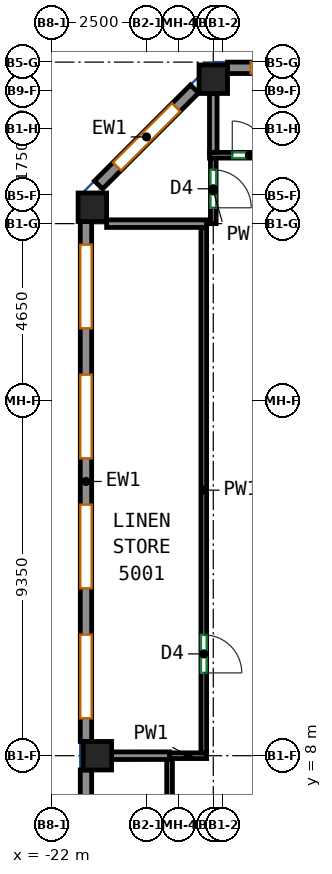
"""IFC4 building model, lengths in metres.
Left out: names, types, materials, properties, quantities, classifications, styles, units other than length and angle.
Written with IfcOpenShell. Run it as: python <this file> out.ifc"""

import sys

from ifc_helpers import new_model, si_unit, direction, frame, frame_2d, origin, origin_2d, place, context, subcontext, project, spatial, rectangle, extrude, source, transform, mapped, element, fill, save


model = new_model("IFC4")
c1 = context("Model", 3, precision=1e-05, world=origin(), true_north=direction((0.0, 1.0)))
c2 = subcontext(c1, "Body", "Model", "MODEL_VIEW")
j1 = project(units=[si_unit("LENGTHUNIT", "METRE"), si_unit("PLANEANGLEUNIT", "RADIAN")], contexts=[c1])
p1 = place(None, origin())
s1 = spatial("IfcSite", under=j1, at=p1, CompositionType="ELEMENT")
p2 = place(p1, origin())
s2 = spatial("IfcBuilding", under=s1, at=p2, CompositionType="ELEMENT")
p3 = place(p2, frame((0.0, 0.0, 206.7)))
s3 = spatial("IfcBuildingStorey", under=s2, at=p3, CompositionType="ELEMENT", Elevation=206.7)
m1 = source(origin(), c2, "Body", "SweptSolid", [
    extrude(rectangle(XDim=0.75, YDim=0.75, at=origin_2d()), origin(), (0.0, 0.0, 1.0), 3.12),
])
for number, where, z_axis, x_axis in (
    (1, (-20.932, 22.432, 0.0), (0.0, 0.0, 1.0), (1.0, 0.0, 0.0)),
    (2, (-20.8, 8.0, 0.0), (0.0, 0.0, 1.0), (1.0, 0.0, 0.0)),
    (3, (-17.75, 25.8, 0.0), (0.0, 0.0, 1.0), (1.0, 0.0, 0.0)),
):
    element("IfcColumn", number, at=place(p3, frame(where, z_axis=z_axis, x_axis=x_axis)), inside=s3, PredefinedType="COLUMN", context=c2, shape_type="MappedRepresentation", body=[
        mapped(m1, transform((0.0, 0.0, 0.0))),
    ])
m2 = source(origin(), c2, "Body", "SweptSolid", [
    extrude(rectangle(XDim=6.833, YDim=0.3, at=frame_2d((3.417, 0.0))), origin(), (0.0, 0.0, 1.0), 3.12),
])
p4 = place(p3, frame((-10.542, 26.1, 0.0), z_axis=(0.0, 0.0, 1.0), x_axis=(-1.0, 0.0, 0.0)))
e4 = element("IfcWall", 4, at=p4, inside=s3, PredefinedType="SOLIDWALL", context=c2, shape_type="MappedRepresentation", body=[
    mapped(m2, transform((0.0, 0.0, 0.0))),
])
p5 = place(p4, frame((0.608, 0.0, 0.85)))
e5 = element("IfcOpeningElement", 5, at=p5, cuts=e4, PredefinedType="OPENING", context=c2, shape_type="SweptSolid", body=[
    extrude(rectangle(XDim=2.2, YDim=1.95, at=frame_2d((1.1, 0.975))), frame((0.0, 0.16, 0.0), z_axis=(0.0, -1.0, 0.0), x_axis=(1.0, 0.0, 0.0)), (0.0, 0.0, 1.0), 0.32),
])
p6 = place(p4, frame((4.025, 0.0, 0.85)))
e6 = element("IfcOpeningElement", 6, at=p6, cuts=e4, PredefinedType="OPENING", context=c2, shape_type="SweptSolid", body=[
    extrude(rectangle(XDim=2.2, YDim=1.95, at=frame_2d((1.1, 0.975))), frame((0.0, 0.16, 0.0), z_axis=(0.0, -1.0, 0.0), x_axis=(1.0, 0.0, 0.0)), (0.0, 0.0, 1.0), 0.32),
])
m3 = source(origin(), c2, "Body", "SweptSolid", [
    extrude(rectangle(XDim=3.571, YDim=0.3, at=frame_2d((1.786, 0.0))), origin(), (0.0, 0.0, 1.0), 3.12),
])
p7 = place(p3, frame((-18.244, 25.544, 0.0), z_axis=(0.0, 0.0, 1.0), x_axis=(-0.707072595841, -0.707140964879, 0.0)))
e7 = element("IfcWall", 7, at=p7, inside=s3, PredefinedType="SOLIDWALL", context=c2, shape_type="MappedRepresentation", body=[
    mapped(m3, transform((0.0, 0.0, 0.0))),
])
p8 = place(p7, frame((0.686, 0.0, 0.85)))
e8 = element("IfcOpeningElement", 8, at=p8, cuts=e7, PredefinedType="OPENING", context=c2, shape_type="SweptSolid", body=[
    extrude(rectangle(XDim=2.2, YDim=1.95, at=frame_2d((1.1, 0.975))), frame((0.0, 0.16, 0.0), z_axis=(0.0, -1.0, 0.0), x_axis=(1.0, 0.0, 0.0)), (0.0, 0.0, 1.0), 0.32),
])
m4 = source(origin(), c2, "Body", "SweptSolid", [
    extrude(rectangle(XDim=13.682, YDim=0.3, at=frame_2d((6.841, 0.0))), origin(), (0.0, 0.0, 1.0), 3.12),
])
p9 = place(p3, frame((-21.1, 22.057, 0.0), z_axis=(0.0, 0.0, 1.0), x_axis=(0.0, -1.0, 0.0)))
e9 = element("IfcWall", 9, at=p9, inside=s3, PredefinedType="SOLIDWALL", context=c2, shape_type="MappedRepresentation", body=[
    mapped(m4, transform((0.0, 0.0, 0.0))),
])
p10 = place(p9, frame((0.61, 0.0, 0.85)))
e10 = element("IfcOpeningElement", 10, at=p10, cuts=e9, PredefinedType="OPENING", context=c2, shape_type="SweptSolid", body=[
    extrude(rectangle(XDim=2.2, YDim=1.95, at=frame_2d((1.1, 0.975))), frame((0.0, 0.16, 0.0), z_axis=(0.0, -1.0, 0.0), x_axis=(1.0, 0.0, 0.0)), (0.0, 0.0, 1.0), 0.32),
])
p11 = place(p9, frame((4.031, 0.0, 0.85)))
e11 = element("IfcOpeningElement", 11, at=p11, cuts=e9, PredefinedType="OPENING", context=c2, shape_type="SweptSolid", body=[
    extrude(rectangle(XDim=2.2, YDim=1.95, at=frame_2d((1.1, 0.975))), frame((0.0, 0.16, 0.0), z_axis=(0.0, -1.0, 0.0), x_axis=(1.0, 0.0, 0.0)), (0.0, 0.0, 1.0), 0.32),
])
p12 = place(p9, frame((7.451, 0.0, 0.85)))
e12 = element("IfcOpeningElement", 12, at=p12, cuts=e9, PredefinedType="OPENING", context=c2, shape_type="SweptSolid", body=[
    extrude(rectangle(XDim=2.2, YDim=1.95, at=frame_2d((1.1, 0.975))), frame((0.0, 0.16, 0.0), z_axis=(0.0, -1.0, 0.0), x_axis=(1.0, 0.0, 0.0)), (0.0, 0.0, 1.0), 0.32),
])
p13 = place(p9, frame((10.872, 0.0, 0.85)))
e13 = element("IfcOpeningElement", 13, at=p13, cuts=e9, PredefinedType="OPENING", context=c2, shape_type="SweptSolid", body=[
    extrude(rectangle(XDim=2.2, YDim=1.95, at=frame_2d((1.1, 0.975))), frame((0.0, 0.16, 0.0), z_axis=(0.0, -1.0, 0.0), x_axis=(1.0, 0.0, 0.0)), (0.0, 0.0, 1.0), 0.32),
])
m5 = source(origin(), c2, "Body", "SweptSolid", [
    extrude(rectangle(XDim=7.812, YDim=0.3, at=frame_2d((3.906, 0.0))), origin(), (0.0, 0.0, 1.0), 3.12),
])
p14 = place(p3, frame((-21.1, 7.625, 0.0), z_axis=(0.0, 0.0, 1.0), x_axis=(0.0, -1.0, 0.0)))
e14 = element("IfcWall", 14, at=p14, inside=s3, PredefinedType="SOLIDWALL", context=c2, shape_type="MappedRepresentation", body=[
    mapped(m5, transform((0.0, 0.0, 0.0))),
])
p15 = place(p14, frame((0.853, 0.0, 0.85)))
e15 = element("IfcOpeningElement", 15, at=p15, cuts=e14, PredefinedType="OPENING", context=c2, shape_type="SweptSolid", body=[
    extrude(rectangle(XDim=2.2, YDim=1.95, at=frame_2d((1.1, 0.975))), frame((0.0, 0.16, 0.0), z_axis=(0.0, -1.0, 0.0), x_axis=(1.0, 0.0, 0.0)), (0.0, 0.0, 1.0), 0.32),
])
p16 = place(p14, frame((4.759, 0.0, 0.85)))
e16 = element("IfcOpeningElement", 16, at=p16, cuts=e14, PredefinedType="OPENING", context=c2, shape_type="SweptSolid", body=[
    extrude(rectangle(XDim=2.2, YDim=1.95, at=frame_2d((1.1, 0.975))), frame((0.0, 0.16, 0.0), z_axis=(0.0, -1.0, 0.0), x_axis=(1.0, 0.0, 0.0)), (0.0, 0.0, 1.0), 0.32),
])
p17 = place(p3, frame((-17.925, 8.0, 0.0), z_axis=(0.0, 0.0, 1.0), x_axis=(-1.0, 0.0, 0.0)))
e17 = element("IfcWall", 17, at=p17, inside=s3, PredefinedType="PARTITIONING", context=c2, shape_type="SweptSolid", body=[
    extrude(rectangle(XDim=0.976, YDim=0.15, at=frame_2d((0.488, 0.0))), origin(), (0.0, 0.0, 1.0), 3.12),
])
p18 = place(p3, frame((-18.0, 21.9, 0.0), z_axis=(0.0, 0.0, 1.0), x_axis=(0.0, -1.0, 0.0)))
e18 = element("IfcWall", 18, at=p18, inside=s3, PredefinedType="PARTITIONING", context=c2, shape_type="SweptSolid", body=[
    extrude(rectangle(XDim=13.825, YDim=0.15, at=frame_2d((6.913, 0.0))), origin(), (0.0, 0.0, 1.0), 3.12),
])
p19 = place(p18, frame((10.721, 0.0, 0.0)))
e19 = element("IfcOpeningElement", 19, at=p19, cuts=e18, PredefinedType="OPENING", context=c2, shape_type="SweptSolid", body=[
    extrude(rectangle(XDim=1.0, YDim=2.1, at=frame_2d((0.5, 1.05))), frame((0.0, 0.085, 0.0), z_axis=(0.0, -1.0, 0.0), x_axis=(1.0, 0.0, 0.0)), (0.0, 0.0, 1.0), 0.17),
])
p20 = place(p3, frame((-18.9, 3.809, 0.0), z_axis=(0.0, 0.0, 1.0), x_axis=(0.0, 1.0, 0.0)))
e20 = element("IfcWall", 20, at=p20, inside=s3, PredefinedType="PARTITIONING", context=c2, shape_type="SweptSolid", body=[
    extrude(rectangle(XDim=4.092, YDim=0.15, at=frame_2d((2.046, 0.0))), origin(), (0.0, 0.0, 1.0), 3.12),
])
p21 = place(p20, frame((2.111, 0.0, 0.0)))
e21 = element("IfcOpeningElement", 21, at=p21, cuts=e20, PredefinedType="OPENING", context=c2, shape_type="SweptSolid", body=[
    extrude(rectangle(XDim=1.0, YDim=2.1, at=frame_2d((0.5, 1.05))), frame((0.0, 0.085, 0.0), z_axis=(0.0, -1.0, 0.0), x_axis=(1.0, 0.0, 0.0)), (0.0, 0.0, 1.0), 0.17),
])
p22 = place(p3, frame((-17.75, 23.725, 0.0), z_axis=(0.0, 0.0, 1.0), x_axis=(0.0, -1.0, 0.0)))
e22 = element("IfcWall", 22, at=p22, inside=s3, PredefinedType="PARTITIONING", context=c2, shape_type="SweptSolid", body=[
    extrude(rectangle(XDim=1.725, YDim=0.15, at=frame_2d((0.863, 0.0))), origin(), (0.0, 0.0, 1.0), 3.12),
])
p23 = place(p22, frame((0.308, 0.0, 0.0)))
e23 = element("IfcOpeningElement", 23, at=p23, cuts=e22, PredefinedType="OPENING", context=c2, shape_type="SweptSolid", body=[
    extrude(rectangle(XDim=1.0, YDim=2.1, at=frame_2d((0.5, 1.05))), frame((0.0, 0.085, 0.0), z_axis=(0.0, -1.0, 0.0), x_axis=(1.0, 0.0, 0.0)), (0.0, 0.0, 1.0), 0.17),
])
p24 = place(p3, frame((-17.85, 23.8, 0.0), z_axis=(0.0, 0.0, 1.0), x_axis=(1.0, 0.0, 0.0)))
e24 = element("IfcWall", 24, at=p24, inside=s3, PredefinedType="PARTITIONING", context=c2, shape_type="SweptSolid", body=[
    extrude(rectangle(XDim=45.7, YDim=0.15, at=frame_2d((22.85, 0.0))), origin(), (0.0, 0.0, 1.0), 3.12),
])
p25 = place(p24, frame((0.6, 0.0, 0.0)))
e25 = element("IfcOpeningElement", 25, at=p25, cuts=e24, PredefinedType="OPENING", context=c2, shape_type="SweptSolid", body=[
    extrude(rectangle(XDim=0.9, YDim=2.1, at=frame_2d((0.45, 1.05))), frame((0.0, 0.085, 0.0), z_axis=(0.0, -1.0, 0.0), x_axis=(1.0, 0.0, 0.0)), (0.0, 0.0, 1.0), 0.17),
])
p26 = place(p24, frame((4.081, 0.0, 0.0)))
e26 = element("IfcOpeningElement", 26, at=p26, cuts=e24, PredefinedType="OPENING", context=c2, shape_type="SweptSolid", body=[
    extrude(rectangle(XDim=1.0, YDim=2.1, at=frame_2d((0.5, 1.05))), frame((0.0, 0.085, 0.0), z_axis=(0.0, -1.0, 0.0), x_axis=(1.0, 0.0, 0.0)), (0.0, 0.0, 1.0), 0.17),
])
p27 = place(p24, frame((9.481, 0.0, 0.0)))
e27 = element("IfcOpeningElement", 27, at=p27, cuts=e24, PredefinedType="OPENING", context=c2, shape_type="SweptSolid", body=[
    extrude(rectangle(XDim=0.9, YDim=2.1, at=frame_2d((0.45, 1.05))), frame((0.0, 0.085, 0.0), z_axis=(0.0, -1.0, 0.0), x_axis=(1.0, 0.0, 0.0)), (0.0, 0.0, 1.0), 0.17),
])
p28 = place(p24, frame((12.803, 0.0, 0.0)))
e28 = element("IfcOpeningElement", 28, at=p28, cuts=e24, PredefinedType="OPENING", context=c2, shape_type="SweptSolid", body=[
    extrude(rectangle(XDim=1.0, YDim=2.1, at=frame_2d((0.5, 1.05))), frame((0.0, 0.085, 0.0), z_axis=(0.0, -1.0, 0.0), x_axis=(1.0, 0.0, 0.0)), (0.0, 0.0, 1.0), 0.17),
])
p29 = place(p24, frame((15.489, 0.0, 0.0)))
e29 = element("IfcOpeningElement", 29, at=p29, cuts=e24, PredefinedType="OPENING", context=c2, shape_type="SweptSolid", body=[
    extrude(rectangle(XDim=0.9, YDim=2.1, at=frame_2d((0.45, 1.05))), frame((0.0, 0.085, 0.0), z_axis=(0.0, -1.0, 0.0), x_axis=(1.0, 0.0, 0.0)), (0.0, 0.0, 1.0), 0.17),
])
p30 = place(p24, frame((21.244, 0.0, 0.0)))
e30 = element("IfcOpeningElement", 30, at=p30, cuts=e24, PredefinedType="OPENING", context=c2, shape_type="SweptSolid", body=[
    extrude(rectangle(XDim=0.9, YDim=2.1, at=frame_2d((0.45, 1.05))), frame((0.0, 0.085, 0.0), z_axis=(0.0, -1.0, 0.0), x_axis=(1.0, 0.0, 0.0)), (0.0, 0.0, 1.0), 0.17),
])
p31 = place(p24, frame((23.542, 0.0, 0.0)))
e31 = element("IfcOpeningElement", 31, at=p31, cuts=e24, PredefinedType="OPENING", context=c2, shape_type="SweptSolid", body=[
    extrude(rectangle(XDim=1.0, YDim=2.1, at=frame_2d((0.5, 1.05))), frame((0.0, 0.085, 0.0), z_axis=(0.0, -1.0, 0.0), x_axis=(1.0, 0.0, 0.0)), (0.0, 0.0, 1.0), 0.17),
])
p32 = place(p24, frame((28.841, 0.0, 0.0)))
e32 = element("IfcOpeningElement", 32, at=p32, cuts=e24, PredefinedType="OPENING", context=c2, shape_type="SweptSolid", body=[
    extrude(rectangle(XDim=0.9, YDim=2.1, at=frame_2d((0.45, 1.05))), frame((0.0, 0.085, 0.0), z_axis=(0.0, -1.0, 0.0), x_axis=(1.0, 0.0, 0.0)), (0.0, 0.0, 1.0), 0.17),
])
p33 = place(p24, frame((32.331, 0.0, 0.0)))
e33 = element("IfcOpeningElement", 33, at=p33, cuts=e24, PredefinedType="OPENING", context=c2, shape_type="SweptSolid", body=[
    extrude(rectangle(XDim=1.0, YDim=2.1, at=frame_2d((0.5, 1.05))), frame((0.0, 0.085, 0.0), z_axis=(0.0, -1.0, 0.0), x_axis=(1.0, 0.0, 0.0)), (0.0, 0.0, 1.0), 0.17),
])
p34 = place(p24, frame((35.42, 0.0, 0.0)))
e34 = element("IfcOpeningElement", 34, at=p34, cuts=e24, PredefinedType="OPENING", context=c2, shape_type="SweptSolid", body=[
    extrude(rectangle(XDim=0.9, YDim=2.1, at=frame_2d((0.45, 1.05))), frame((0.0, 0.085, 0.0), z_axis=(0.0, -1.0, 0.0), x_axis=(1.0, 0.0, 0.0)), (0.0, 0.0, 1.0), 0.17),
])
p35 = place(p24, frame((40.317, 0.0, 0.0)))
e35 = element("IfcOpeningElement", 35, at=p35, cuts=e24, PredefinedType="OPENING", context=c2, shape_type="SweptSolid", body=[
    extrude(rectangle(XDim=0.9, YDim=2.1, at=frame_2d((0.45, 1.05))), frame((0.0, 0.085, 0.0), z_axis=(0.0, -1.0, 0.0), x_axis=(1.0, 0.0, 0.0)), (0.0, 0.0, 1.0), 0.17),
])
p36 = place(p24, frame((43.199, 0.0, 0.0)))
e36 = element("IfcOpeningElement", 36, at=p36, cuts=e24, PredefinedType="OPENING", context=c2, shape_type="SweptSolid", body=[
    extrude(rectangle(XDim=1.0, YDim=2.1, at=frame_2d((0.5, 1.05))), frame((0.0, 0.085, 0.0), z_axis=(0.0, -1.0, 0.0), x_axis=(1.0, 0.0, 0.0)), (0.0, 0.0, 1.0), 0.17),
])
p37 = place(p3, frame((-20.425, 8.0, 0.0), z_axis=(0.0, 0.0, 1.0), x_axis=(0.999999794741, 0.000640717472, 0.0)))
e37 = element("IfcWall", 37, at=p37, inside=s3, PredefinedType="PARTITIONING", context=c2, shape_type="SweptSolid", body=[
    extrude(rectangle(XDim=1.524, YDim=0.2, at=frame_2d((0.762, 0.0))), origin(), (0.0, 0.0, 1.0), 3.12),
])
p38 = place(p3, frame((-17.927, 22.0, 0.0), z_axis=(0.0, 0.0, 1.0), x_axis=(-1.0, 0.0, 0.0)))
e38 = element("IfcWall", 38, at=p38, inside=s3, PredefinedType="PARTITIONING", context=c2, shape_type="SweptSolid", body=[
    extrude(rectangle(XDim=2.63, YDim=0.2, at=frame_2d((1.315, 0.0))), origin(), (0.0, 0.0, 1.0), 3.12),
])
p39 = place(p3, frame((-17.75, 23.877, 0.0), z_axis=(0.0, 0.0, 1.0), x_axis=(0.0, 1.0, 0.0)))
e39 = element("IfcWall", 39, at=p39, inside=s3, PredefinedType="PARTITIONING", context=c2, shape_type="SweptSolid", body=[
    extrude(rectangle(XDim=1.548, YDim=0.2, at=frame_2d((0.774, 0.0))), origin(), (0.0, 0.0, 1.0), 3.12),
])
p40 = place(p6, origin())
e40 = element("IfcWindow", 40, at=p40, inside=s3, PartitioningType="SINGLE_PANEL", PredefinedType="WINDOW", context=c2, shape_type="SweptSolid", body=[
    extrude(rectangle(XDim=2.2, YDim=1.95, at=frame_2d((1.1, 0.975))), frame((0.0, 0.03, 0.0), z_axis=(0.0, -1.0, 0.0), x_axis=(1.0, 0.0, 0.0)), (0.0, 0.0, 1.0), 0.06),
])
fill(e6, e40)
p41 = place(p8, origin())
e41 = element("IfcWindow", 41, at=p41, inside=s3, PartitioningType="SINGLE_PANEL", PredefinedType="WINDOW", context=c2, shape_type="SweptSolid", body=[
    extrude(rectangle(XDim=2.2, YDim=1.95, at=frame_2d((1.1, 0.975))), frame((0.0, 0.03, 0.0), z_axis=(0.0, -1.0, 0.0), x_axis=(1.0, 0.0, 0.0)), (0.0, 0.0, 1.0), 0.06),
])
fill(e8, e41)
p42 = place(p10, origin())
e42 = element("IfcWindow", 42, at=p42, inside=s3, PartitioningType="SINGLE_PANEL", PredefinedType="WINDOW", context=c2, shape_type="SweptSolid", body=[
    extrude(rectangle(XDim=2.2, YDim=1.95, at=frame_2d((1.1, 0.975))), frame((0.0, 0.03, 0.0), z_axis=(0.0, -1.0, 0.0), x_axis=(1.0, 0.0, 0.0)), (0.0, 0.0, 1.0), 0.06),
])
fill(e10, e42)
p43 = place(p11, origin())
e43 = element("IfcWindow", 43, at=p43, inside=s3, PartitioningType="SINGLE_PANEL", PredefinedType="WINDOW", context=c2, shape_type="SweptSolid", body=[
    extrude(rectangle(XDim=2.2, YDim=1.95, at=frame_2d((1.1, 0.975))), frame((0.0, 0.03, 0.0), z_axis=(0.0, -1.0, 0.0), x_axis=(1.0, 0.0, 0.0)), (0.0, 0.0, 1.0), 0.06),
])
fill(e11, e43)
p44 = place(p12, origin())
e44 = element("IfcWindow", 44, at=p44, inside=s3, PartitioningType="SINGLE_PANEL", PredefinedType="WINDOW", context=c2, shape_type="SweptSolid", body=[
    extrude(rectangle(XDim=2.2, YDim=1.95, at=frame_2d((1.1, 0.975))), frame((0.0, 0.03, 0.0), z_axis=(0.0, -1.0, 0.0), x_axis=(1.0, 0.0, 0.0)), (0.0, 0.0, 1.0), 0.06),
])
fill(e12, e44)
p45 = place(p13, origin())
e45 = element("IfcWindow", 45, at=p45, inside=s3, PartitioningType="SINGLE_PANEL", PredefinedType="WINDOW", context=c2, shape_type="SweptSolid", body=[
    extrude(rectangle(XDim=2.2, YDim=1.95, at=frame_2d((1.1, 0.975))), frame((0.0, 0.03, 0.0), z_axis=(0.0, -1.0, 0.0), x_axis=(1.0, 0.0, 0.0)), (0.0, 0.0, 1.0), 0.06),
])
fill(e13, e45)
p46 = place(p19, origin())
e46 = element("IfcDoor", 46, at=p46, inside=s3, OperationType="SINGLE_SWING_RIGHT", PredefinedType="DOOR", context=c2, shape_type="SweptSolid", body=[
    extrude(rectangle(XDim=1.0, YDim=2.1, at=frame_2d((0.5, 1.05))), frame((0.0, 0.025, 0.0), z_axis=(0.0, -1.0, 0.0), x_axis=(1.0, 0.0, 0.0)), (0.0, 0.0, 1.0), 0.05),
])
fill(e19, e46)
p47 = place(p23, origin())
e47 = element("IfcDoor", 47, at=p47, inside=s3, OperationType="SINGLE_SWING_RIGHT", PredefinedType="DOOR", context=c2, shape_type="SweptSolid", body=[
    extrude(rectangle(XDim=1.0, YDim=2.1, at=frame_2d((0.5, 1.05))), frame((0.0, 0.025, 0.0), z_axis=(0.0, -1.0, 0.0), x_axis=(1.0, 0.0, 0.0)), (0.0, 0.0, 1.0), 0.05),
])
fill(e23, e47)
p48 = place(p25, origin())
e48 = element("IfcDoor", 48, at=p48, inside=s3, OperationType="SINGLE_SWING_LEFT", PredefinedType="DOOR", context=c2, shape_type="SweptSolid", body=[
    extrude(rectangle(XDim=0.9, YDim=2.1, at=frame_2d((0.45, 1.05))), frame((0.0, 0.025, 0.0), z_axis=(0.0, -1.0, 0.0), x_axis=(1.0, 0.0, 0.0)), (0.0, 0.0, 1.0), 0.05),
])
fill(e25, e48)
save(model, sys.argv[1])
